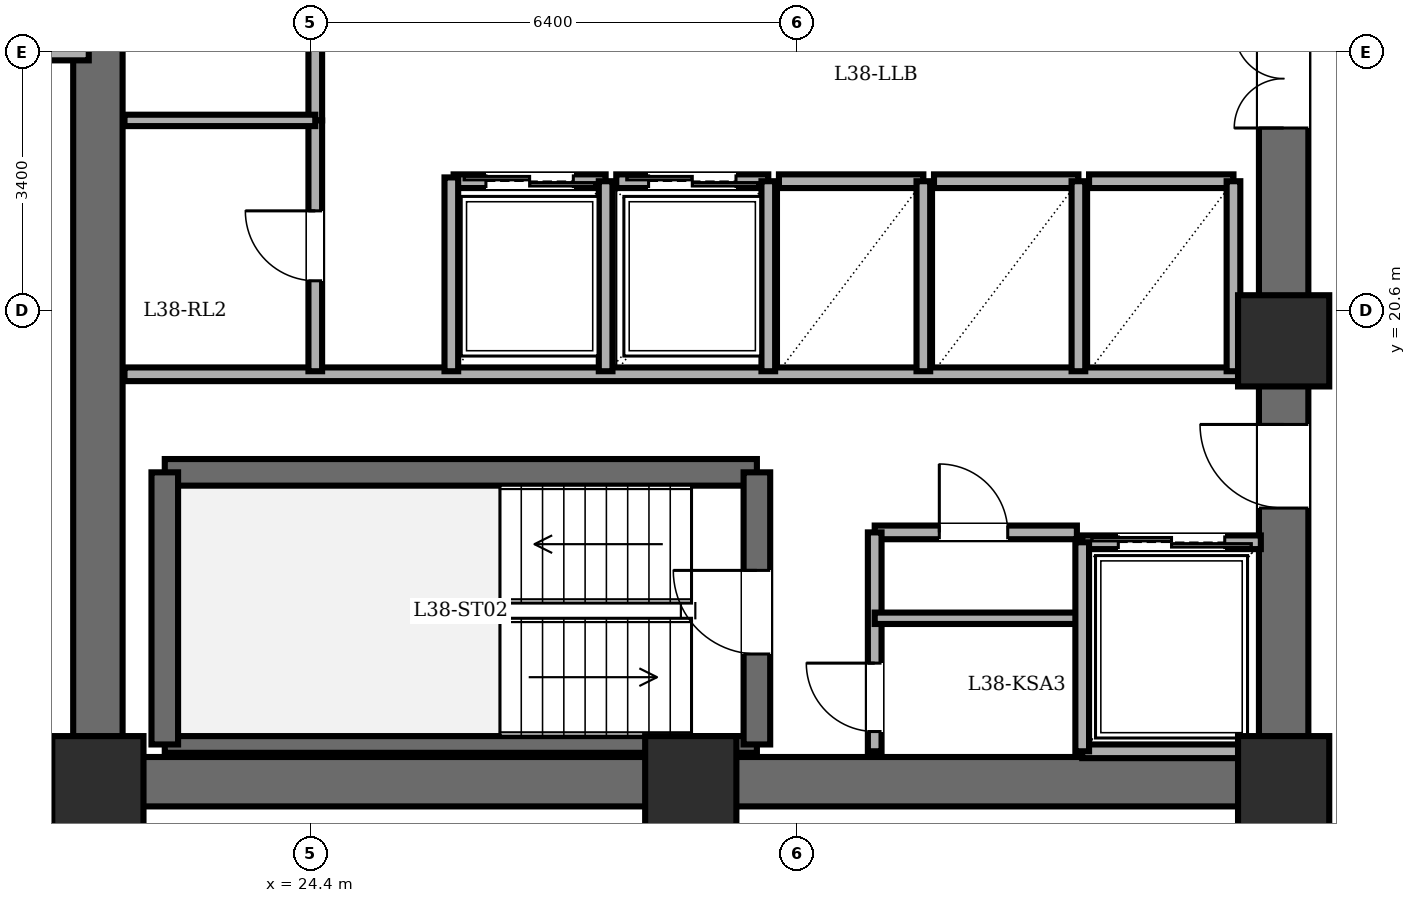
"""IFC4 building model, lengths in metres.
Left out: names, types, materials, properties, quantities, classifications, styles, units other than length and angle.
Written with IfcOpenShell. Run it as: python <this file> out.ifc"""

import sys

from ifc_helpers import new_model, si_unit, direction, frame, frame_2d, origin, origin_2d, place, context, subcontext, project, spatial, rectangle, extrude, element, fill, save


model = new_model("IFC4")
c1 = context("Model", 3, precision=1e-05, world=origin(), true_north=direction((0.0, 1.0)))
c2 = subcontext(c1, "Body", "Model", "MODEL_VIEW")
j1 = project(units=[si_unit("LENGTHUNIT", "METRE"), si_unit("PLANEANGLEUNIT", "RADIAN")], contexts=[c1])
p1 = place(None, origin())
s1 = spatial("IfcSite", under=j1, at=p1, CompositionType="ELEMENT")
p2 = place(p1, origin())
s2 = spatial("IfcBuilding", under=s1, at=p2, CompositionType="ELEMENT")
p3 = place(p2, frame((0.0, 0.0, 147.4)))
s3 = spatial("IfcBuildingStorey", under=s2, at=p3, CompositionType="ELEMENT", Elevation=147.4)
for number, where, z_axis, x_axis in (
    (1, (21.6, 14.4, 0.0), (0.0, 0.0, 1.0), (1.0, 0.0, 0.0)),
    (2, (29.4, 14.4, 0.0), (0.0, 0.0, 1.0), (1.0, 0.0, 0.0)),
    (3, (37.2, 14.4, 0.0), (0.0, 0.0, 1.0), (1.0, 0.0, 0.0)),
    (4, (37.2, 20.2, 0.0), (0.0, 0.0, 1.0), (1.0, 0.0, 0.0)),
):
    element("IfcColumn", number, at=place(p3, frame(where, z_axis=z_axis, x_axis=x_axis)), inside=s3, PredefinedType="COLUMN", context=c2, shape_type="SweptSolid", body=[
        extrude(rectangle(XDim=1.2, YDim=1.2, at=origin_2d()), origin(), (0.0, 0.0, 1.0), 3.6),
    ])
p4 = place(p3, frame((21.6, 14.4, 0.0), z_axis=(0.0, 0.0, 1.0), x_axis=(0.0, 1.0, 0.0)))
e5 = element("IfcWall", 5, at=p4, inside=s3, PredefinedType="SHEAR", context=c2, shape_type="SweptSolid", body=[
    extrude(rectangle(XDim=19.2, YDim=0.65, at=frame_2d((9.6, 0.0))), origin(), (0.0, 0.0, 1.0), 3.4),
])
p5 = place(p3, frame((37.2, 14.4, 0.0), z_axis=(0.0, 0.0, 1.0), x_axis=(-1.0, 0.0, 0.0)))
e6 = element("IfcWall", 6, at=p5, inside=s3, PredefinedType="SHEAR", context=c2, shape_type="SweptSolid", body=[
    extrude(rectangle(XDim=15.6, YDim=0.65, at=frame_2d((7.8, 0.0))), origin(), (0.0, 0.0, 1.0), 3.4),
])
p6 = place(p3, frame((37.2, 14.4, 0.0), z_axis=(0.0, 0.0, 1.0), x_axis=(0.0, 1.0, 0.0)))
e7 = element("IfcWall", 7, at=p6, inside=s3, PredefinedType="SHEAR", context=c2, shape_type="SweptSolid", body=[
    extrude(rectangle(XDim=19.2, YDim=0.65, at=frame_2d((9.6, 0.0))), origin(), (0.0, 0.0, 1.0), 3.4),
])
p7 = place(p6, frame((15.8, 0.0, 0.0)))
e8 = element("IfcOpeningElement", 8, at=p7, cuts=e7, PredefinedType="OPENING", context=c2, shape_type="SweptSolid", body=[
    extrude(rectangle(XDim=1.15, YDim=2.15, at=frame_2d((0.575, 1.075))), frame((0.0, 0.335, 0.0), z_axis=(0.0, -1.0, 0.0), x_axis=(1.0, 0.0, 0.0)), (0.0, 0.0, 1.0), 0.67),
])
p8 = place(p6, frame((3.6, 0.0, 0.0)))
e9 = element("IfcOpeningElement", 9, at=p8, cuts=e7, PredefinedType="OPENING", context=c2, shape_type="SweptSolid", body=[
    extrude(rectangle(XDim=1.1, YDim=2.15, at=frame_2d((0.55, 1.075))), frame((0.0, 0.335, 0.0), z_axis=(0.0, -1.0, 0.0), x_axis=(1.0, 0.0, 0.0)), (0.0, 0.0, 1.0), 0.67),
])
p9 = place(p6, frame((8.6, 0.0, 0.0)))
e10 = element("IfcOpeningElement", 10, at=p9, cuts=e7, PredefinedType="OPENING", context=c2, shape_type="SweptSolid", body=[
    extrude(rectangle(XDim=1.3, YDim=2.2, at=frame_2d((0.65, 1.1))), frame((0.0, 0.335, 0.0), z_axis=(0.0, -1.0, 0.0), x_axis=(1.0, 0.0, 0.0)), (0.0, 0.0, 1.0), 0.67),
])
p10 = place(p3, frame((22.48, 18.47, 0.0), z_axis=(0.0, 0.0, 1.0), x_axis=(1.0, 0.0, 0.0)))
e11 = element("IfcWall", 11, at=p10, inside=s3, PredefinedType="SOLIDWALL", context=c2, shape_type="SweptSolid", body=[
    extrude(rectangle(XDim=7.79, YDim=0.35, at=frame_2d((3.895, 0.0))), origin(), (0.0, 0.0, 1.0), 3.4),
])
p11 = place(p3, frame((22.48, 14.89, 0.0), z_axis=(0.0, 0.0, 1.0), x_axis=(1.0, 0.0, 0.0)))
e12 = element("IfcWall", 12, at=p11, inside=s3, PredefinedType="PARTITIONING", context=c2, shape_type="SweptSolid", body=[
    extrude(rectangle(XDim=7.79, YDim=0.22, at=frame_2d((3.895, 0.0))), origin(), (0.0, 0.0, 1.0), 3.4),
])
p12 = place(p3, frame((22.48, 14.89, 0.0), z_axis=(0.0, 0.0, 1.0), x_axis=(0.0, 1.0, 0.0)))
e13 = element("IfcWall", 13, at=p12, inside=s3, PredefinedType="SOLIDWALL", context=c2, shape_type="SweptSolid", body=[
    extrude(rectangle(XDim=3.58, YDim=0.35, at=frame_2d((1.79, 0.0))), origin(), (0.0, 0.0, 1.0), 3.4),
])
p13 = place(p3, frame((30.27, 14.89, 0.0), z_axis=(0.0, 0.0, 1.0), x_axis=(0.0, 1.0, 0.0)))
e14 = element("IfcWall", 14, at=p13, inside=s3, PredefinedType="SOLIDWALL", context=c2, shape_type="SweptSolid", body=[
    extrude(rectangle(XDim=3.58, YDim=0.35, at=frame_2d((1.79, 0.0))), origin(), (0.0, 0.0, 1.0), 3.4),
])
p14 = place(p13, frame((1.19, 0.0, 0.0)))
e15 = element("IfcOpeningElement", 15, at=p14, cuts=e14, PredefinedType="OPENING", context=c2, shape_type="SweptSolid", body=[
    extrude(rectangle(XDim=1.1, YDim=2.15, at=frame_2d((0.55, 1.075))), frame((0.0, 0.185, 0.0), z_axis=(0.0, -1.0, 0.0), x_axis=(1.0, 0.0, 0.0)), (0.0, 0.0, 1.0), 0.37),
])
p15 = place(p3, frame((21.95, 19.76, 0.0), z_axis=(0.0, 0.0, 1.0), x_axis=(1.0, 0.0, 0.0)))
e16 = element("IfcWall", 16, at=p15, inside=s3, PredefinedType="PARTITIONING", context=c2, shape_type="SweptSolid", body=[
    extrude(rectangle(XDim=14.87, YDim=0.18, at=frame_2d((7.435, 0.0))), origin(), (0.0, 0.0, 1.0), 3.4),
])
p16 = place(p3, frame((31.82, 17.68, 0.0), z_axis=(0.0, 0.0, 1.0), x_axis=(1.0, 0.0, 0.0)))
e17 = element("IfcWall", 17, at=p16, inside=s3, PredefinedType="PARTITIONING", context=c2, shape_type="SweptSolid", body=[
    extrude(rectangle(XDim=2.66, YDim=0.18, at=frame_2d((1.33, 0.0))), origin(), (0.0, 0.0, 1.0), 3.4),
])
p17 = place(p16, frame((0.85, 0.0, 0.0)))
e18 = element("IfcOpeningElement", 18, at=p17, cuts=e17, PredefinedType="OPENING", context=c2, shape_type="SweptSolid", body=[
    extrude(rectangle(XDim=0.9, YDim=2.05, at=frame_2d((0.45, 1.025))), frame((0.0, 0.1, 0.0), z_axis=(0.0, -1.0, 0.0), x_axis=(1.0, 0.0, 0.0)), (0.0, 0.0, 1.0), 0.2),
])
p18 = place(p3, frame((31.82, 14.8, 0.0), z_axis=(0.0, 0.0, 1.0), x_axis=(0.0, 1.0, 0.0)))
e19 = element("IfcWall", 19, at=p18, inside=s3, PredefinedType="PARTITIONING", context=c2, shape_type="SweptSolid", body=[
    extrude(rectangle(XDim=2.88, YDim=0.18, at=frame_2d((1.44, 0.0))), origin(), (0.0, 0.0, 1.0), 3.4),
])
p19 = place(p18, frame((0.26, 0.0, 0.0)))
e20 = element("IfcOpeningElement", 20, at=p19, cuts=e19, PredefinedType="OPENING", context=c2, shape_type="SweptSolid", body=[
    extrude(rectangle(XDim=0.9, YDim=2.05, at=frame_2d((0.45, 1.025))), frame((0.0, 0.1, 0.0), z_axis=(0.0, -1.0, 0.0), x_axis=(1.0, 0.0, 0.0)), (0.0, 0.0, 1.0), 0.2),
])
p20 = place(p3, frame((31.82, 16.55, 0.0), z_axis=(0.0, 0.0, 1.0), x_axis=(1.0, 0.0, 0.0)))
e21 = element("IfcWall", 21, at=p20, inside=s3, PredefinedType="PARTITIONING", context=c2, shape_type="SweptSolid", body=[
    extrude(rectangle(XDim=2.66, YDim=0.15, at=frame_2d((1.33, 0.0))), origin(), (0.0, 0.0, 1.0), 3.4),
])
p21 = place(p3, frame((34.55, 17.55, 0.0), z_axis=(0.0, 0.0, 1.0), x_axis=(1.0, 0.0, 0.0)))
e22 = element("IfcWall", 22, at=p21, inside=s3, PredefinedType="PARTITIONING", context=c2, shape_type="SweptSolid", body=[
    extrude(rectangle(XDim=2.35, YDim=0.18, at=frame_2d((1.175, 0.0))), origin(), (0.0, 0.0, 1.0), 3.4),
])
p22 = place(p21, frame((0.475, 0.0, 0.0)))
e23 = element("IfcOpeningElement", 23, at=p22, cuts=e22, PredefinedType="OPENING", context=c2, shape_type="SweptSolid", body=[
    extrude(rectangle(XDim=1.4, YDim=2.3, at=frame_2d((0.7, 1.15))), frame((0.0, 0.1, 0.0), z_axis=(0.0, -1.0, 0.0), x_axis=(1.0, 0.0, 0.0)), (0.0, 0.0, 1.0), 0.2),
])
p23 = place(p3, frame((36.9, 14.8, 0.0), z_axis=(0.0, 0.0, 1.0), x_axis=(-1.0, 0.0, 0.0)))
e24 = element("IfcWall", 24, at=p23, inside=s3, PredefinedType="PARTITIONING", context=c2, shape_type="SweptSolid", body=[
    extrude(rectangle(XDim=2.35, YDim=0.18, at=frame_2d((1.175, 0.0))), origin(), (0.0, 0.0, 1.0), 3.4),
])
p24 = place(p3, frame((34.55, 17.55, 0.0), z_axis=(0.0, 0.0, 1.0), x_axis=(0.0, -1.0, 0.0)))
e25 = element("IfcWall", 25, at=p24, inside=s3, PredefinedType="PARTITIONING", context=c2, shape_type="SweptSolid", body=[
    extrude(rectangle(XDim=2.75, YDim=0.18, at=frame_2d((1.375, 0.0))), origin(), (0.0, 0.0, 1.0), 3.4),
])
p25 = place(p3, frame((26.28, 22.3, 0.0), z_axis=(0.0, 0.0, 1.0), x_axis=(1.0, 0.0, 0.0)))
e26 = element("IfcWall", 26, at=p25, inside=s3, PredefinedType="PARTITIONING", context=c2, shape_type="SweptSolid", body=[
    extrude(rectangle(XDim=2.0, YDim=0.18, at=frame_2d((1.0, 0.0))), origin(), (0.0, 0.0, 1.0), 3.4),
])
p26 = place(p25, frame((0.425, 0.0, 0.0)))
e27 = element("IfcOpeningElement", 27, at=p26, cuts=e26, PredefinedType="OPENING", context=c2, shape_type="SweptSolid", body=[
    extrude(rectangle(XDim=1.15, YDim=2.2, at=frame_2d((0.575, 1.1))), frame((0.0, 0.1, 0.0), z_axis=(0.0, -1.0, 0.0), x_axis=(1.0, 0.0, 0.0)), (0.0, 0.0, 1.0), 0.2),
])
p27 = place(p3, frame((28.28, 19.8, 0.0), z_axis=(0.0, 0.0, 1.0), x_axis=(0.0, 1.0, 0.0)))
e28 = element("IfcWall", 28, at=p27, inside=s3, PredefinedType="PARTITIONING", context=c2, shape_type="SweptSolid", body=[
    extrude(rectangle(XDim=2.5, YDim=0.18, at=frame_2d((1.25, 0.0))), origin(), (0.0, 0.0, 1.0), 3.4),
])
p28 = place(p3, frame((28.42, 22.3, 0.0), z_axis=(0.0, 0.0, 1.0), x_axis=(1.0, 0.0, 0.0)))
e29 = element("IfcWall", 29, at=p28, inside=s3, PredefinedType="PARTITIONING", context=c2, shape_type="SweptSolid", body=[
    extrude(rectangle(XDim=2.0, YDim=0.18, at=frame_2d((1.0, 0.0))), origin(), (0.0, 0.0, 1.0), 3.4),
])
p29 = place(p28, frame((0.425, 0.0, 0.0)))
e30 = element("IfcOpeningElement", 30, at=p29, cuts=e29, PredefinedType="OPENING", context=c2, shape_type="SweptSolid", body=[
    extrude(rectangle(XDim=1.15, YDim=2.2, at=frame_2d((0.575, 1.1))), frame((0.0, 0.1, 0.0), z_axis=(0.0, -1.0, 0.0), x_axis=(1.0, 0.0, 0.0)), (0.0, 0.0, 1.0), 0.2),
])
p30 = place(p3, frame((30.42, 19.8, 0.0), z_axis=(0.0, 0.0, 1.0), x_axis=(0.0, 1.0, 0.0)))
e31 = element("IfcWall", 31, at=p30, inside=s3, PredefinedType="PARTITIONING", context=c2, shape_type="SweptSolid", body=[
    extrude(rectangle(XDim=2.5, YDim=0.18, at=frame_2d((1.25, 0.0))), origin(), (0.0, 0.0, 1.0), 3.4),
])
p31 = place(p3, frame((30.56, 22.3, 0.0), z_axis=(0.0, 0.0, 1.0), x_axis=(1.0, 0.0, 0.0)))
e32 = element("IfcWall", 32, at=p31, inside=s3, PredefinedType="PARTITIONING", context=c2, shape_type="SweptSolid", body=[
    extrude(rectangle(XDim=1.9, YDim=0.18, at=frame_2d((0.95, 0.0))), origin(), (0.0, 0.0, 1.0), 3.4),
])
p32 = place(p3, frame((32.46, 19.8, 0.0), z_axis=(0.0, 0.0, 1.0), x_axis=(0.0, 1.0, 0.0)))
e33 = element("IfcWall", 33, at=p32, inside=s3, PredefinedType="PARTITIONING", context=c2, shape_type="SweptSolid", body=[
    extrude(rectangle(XDim=2.5, YDim=0.18, at=frame_2d((1.25, 0.0))), origin(), (0.0, 0.0, 1.0), 3.4),
])
p33 = place(p3, frame((32.6, 22.3, 0.0), z_axis=(0.0, 0.0, 1.0), x_axis=(1.0, 0.0, 0.0)))
e34 = element("IfcWall", 34, at=p33, inside=s3, PredefinedType="PARTITIONING", context=c2, shape_type="SweptSolid", body=[
    extrude(rectangle(XDim=1.9, YDim=0.18, at=frame_2d((0.95, 0.0))), origin(), (0.0, 0.0, 1.0), 3.4),
])
p34 = place(p3, frame((34.5, 19.8, 0.0), z_axis=(0.0, 0.0, 1.0), x_axis=(0.0, 1.0, 0.0)))
e35 = element("IfcWall", 35, at=p34, inside=s3, PredefinedType="PARTITIONING", context=c2, shape_type="SweptSolid", body=[
    extrude(rectangle(XDim=2.5, YDim=0.18, at=frame_2d((1.25, 0.0))), origin(), (0.0, 0.0, 1.0), 3.4),
])
p35 = place(p3, frame((34.64, 22.3, 0.0), z_axis=(0.0, 0.0, 1.0), x_axis=(1.0, 0.0, 0.0)))
e36 = element("IfcWall", 36, at=p35, inside=s3, PredefinedType="PARTITIONING", context=c2, shape_type="SweptSolid", body=[
    extrude(rectangle(XDim=1.9, YDim=0.18, at=frame_2d((0.95, 0.0))), origin(), (0.0, 0.0, 1.0), 3.4),
])
p36 = place(p3, frame((36.54, 19.8, 0.0), z_axis=(0.0, 0.0, 1.0), x_axis=(0.0, 1.0, 0.0)))
e37 = element("IfcWall", 37, at=p36, inside=s3, PredefinedType="PARTITIONING", context=c2, shape_type="SweptSolid", body=[
    extrude(rectangle(XDim=2.5, YDim=0.18, at=frame_2d((1.25, 0.0))), origin(), (0.0, 0.0, 1.0), 3.4),
])
p37 = place(p3, frame((24.46, 23.1, 0.0), z_axis=(0.0, 0.0, 1.0), x_axis=(0.0, 1.0, 0.0)))
e38 = element("IfcWall", 38, at=p37, inside=s3, PredefinedType="PARTITIONING", context=c2, shape_type="SweptSolid", body=[
    extrude(rectangle(XDim=4.4, YDim=0.18, at=frame_2d((2.2, 0.0))), origin(), (0.0, 0.0, 1.0), 3.4),
])
p38 = place(p37, frame((1.74, 0.0, 0.0)))
e39 = element("IfcOpeningElement", 39, at=p38, cuts=e38, PredefinedType="OPENING", context=c2, shape_type="SweptSolid", body=[
    extrude(rectangle(XDim=0.92, YDim=2.1, at=frame_2d((0.46, 1.05))), frame((0.0, 0.1, 0.0), z_axis=(0.0, -1.0, 0.0), x_axis=(1.0, 0.0, 0.0)), (0.0, 0.0, 1.0), 0.2),
])
p39 = place(p3, frame((24.46, 19.8, 0.0), z_axis=(0.0, 0.0, 1.0), x_axis=(0.0, 1.0, 0.0)))
e40 = element("IfcWall", 40, at=p39, inside=s3, PredefinedType="PARTITIONING", context=c2, shape_type="SweptSolid", body=[
    extrude(rectangle(XDim=3.3, YDim=0.18, at=frame_2d((1.65, 0.0))), origin(), (0.0, 0.0, 1.0), 3.4),
])
p40 = place(p39, frame((1.19, 0.0, 0.0)))
e41 = element("IfcOpeningElement", 41, at=p40, cuts=e40, PredefinedType="OPENING", context=c2, shape_type="SweptSolid", body=[
    extrude(rectangle(XDim=0.92, YDim=2.1, at=frame_2d((0.46, 1.05))), frame((0.0, 0.1, 0.0), z_axis=(0.0, -1.0, 0.0), x_axis=(1.0, 0.0, 0.0)), (0.0, 0.0, 1.0), 0.2),
])
p41 = place(p3, frame((21.95, 23.1, 0.0), z_axis=(0.0, 0.0, 1.0), x_axis=(1.0, 0.0, 0.0)))
e42 = element("IfcWall", 42, at=p41, inside=s3, PredefinedType="PARTITIONING", context=c2, shape_type="SweptSolid", body=[
    extrude(rectangle(XDim=2.51, YDim=0.15, at=frame_2d((1.255, 0.0))), origin(), (0.0, 0.0, 1.0), 3.4),
])
p42 = place(p3, frame((26.25, 19.8, 0.0), z_axis=(0.0, 0.0, 1.0), x_axis=(0.0, 1.0, 0.0)))
e43 = element("IfcWall", 43, at=p42, inside=s3, PredefinedType="PARTITIONING", context=c2, shape_type="SweptSolid", body=[
    extrude(rectangle(XDim=2.55, YDim=0.18, at=frame_2d((1.275, 0.0))), origin(), (0.0, 0.0, 1.0), 3.4),
])
p43 = place(p3, frame((13.8, 14.18, 0.0), z_axis=(0.0, 0.0, 1.0), x_axis=(1.0, 0.0, 0.0)))
e44 = element("IfcWall", 44, at=p43, inside=s3, PredefinedType="PARTITIONING", context=c2, shape_type="SweptSolid", body=[
    extrude(rectangle(XDim=7.68, YDim=0.22, at=frame_2d((3.84, 0.0))), origin(), (0.0, 0.0, 1.0), 3.4),
])
p44 = place(p43, frame((3.68, 0.0, 0.0)))
e45 = element("IfcOpeningElement", 45, at=p44, cuts=e44, PredefinedType="OPENING", context=c2, shape_type="SweptSolid", body=[
    extrude(rectangle(XDim=1.0, YDim=2.15, at=frame_2d((0.5, 1.075))), frame((0.0, 0.12, 0.0), z_axis=(0.0, -1.0, 0.0), x_axis=(1.0, 0.0, 0.0)), (0.0, 0.0, 1.0), 0.24),
])
p45 = place(p3, frame((13.8, 24.0, 0.0), z_axis=(0.0, 0.0, 1.0), x_axis=(1.0, 0.0, 0.0)))
e46 = element("IfcWall", 46, at=p45, inside=s3, PredefinedType="PARTITIONING", context=c2, shape_type="SweptSolid", body=[
    extrude(rectangle(XDim=7.68, YDim=0.22, at=frame_2d((3.84, 0.0))), origin(), (0.0, 0.0, 1.0), 3.4),
])
p46 = place(p14, origin())
e47 = element("IfcDoor", 47, at=p46, inside=s3, OperationType="SINGLE_SWING_RIGHT", PredefinedType="DOOR", context=c2, shape_type="SweptSolid", body=[
    extrude(rectangle(XDim=1.1, YDim=2.15, at=frame_2d((0.55, 1.075))), frame((0.0, 0.025, 0.0), z_axis=(0.0, -1.0, 0.0), x_axis=(1.0, 0.0, 0.0)), (0.0, 0.0, 1.0), 0.05),
])
fill(e15, e47)
p47 = place(p8, origin())
e48 = element("IfcDoor", 48, at=p47, inside=s3, OperationType="SINGLE_SWING_RIGHT", PredefinedType="DOOR", context=c2, shape_type="SweptSolid", body=[
    extrude(rectangle(XDim=1.1, YDim=2.15, at=frame_2d((0.55, 1.075))), frame((0.0, 0.025, 0.0), z_axis=(0.0, -1.0, 0.0), x_axis=(1.0, 0.0, 0.0)), (0.0, 0.0, 1.0), 0.05),
])
fill(e9, e48)
p48 = place(p17, origin())
e49 = element("IfcDoor", 49, at=p48, inside=s3, OperationType="SINGLE_SWING_LEFT", PredefinedType="DOOR", context=c2, shape_type="SweptSolid", body=[
    extrude(rectangle(XDim=0.9, YDim=2.05, at=frame_2d((0.45, 1.025))), frame((0.0, 0.025, 0.0), z_axis=(0.0, -1.0, 0.0), x_axis=(1.0, 0.0, 0.0)), (0.0, 0.0, 1.0), 0.05),
])
fill(e18, e49)
p49 = place(p19, origin())
e50 = element("IfcDoor", 50, at=p49, inside=s3, OperationType="SINGLE_SWING_RIGHT", PredefinedType="DOOR", context=c2, shape_type="SweptSolid", body=[
    extrude(rectangle(XDim=0.9, YDim=2.05, at=frame_2d((0.45, 1.025))), frame((0.0, 0.025, 0.0), z_axis=(0.0, -1.0, 0.0), x_axis=(1.0, 0.0, 0.0)), (0.0, 0.0, 1.0), 0.05),
])
fill(e20, e50)
p50 = place(p22, origin())
e51 = element("IfcDoor", 51, at=p50, inside=s3, OperationType="DOUBLE_DOOR_SLIDING", PredefinedType="DOOR", context=c2, shape_type="SweptSolid", body=[
    extrude(rectangle(XDim=1.4, YDim=2.3, at=frame_2d((0.7, 1.15))), frame((0.0, 0.025, 0.0), z_axis=(0.0, -1.0, 0.0), x_axis=(1.0, 0.0, 0.0)), (0.0, 0.0, 1.0), 0.05),
])
fill(e23, e51)
p51 = place(p26, origin())
e52 = element("IfcDoor", 52, at=p51, inside=s3, OperationType="DOUBLE_DOOR_SLIDING", PredefinedType="DOOR", context=c2, shape_type="SweptSolid", body=[
    extrude(rectangle(XDim=1.15, YDim=2.2, at=frame_2d((0.575, 1.1))), frame((0.0, 0.025, 0.0), z_axis=(0.0, -1.0, 0.0), x_axis=(1.0, 0.0, 0.0)), (0.0, 0.0, 1.0), 0.05),
])
fill(e27, e52)
p52 = place(p29, origin())
e53 = element("IfcDoor", 53, at=p52, inside=s3, OperationType="DOUBLE_DOOR_SLIDING", PredefinedType="DOOR", context=c2, shape_type="SweptSolid", body=[
    extrude(rectangle(XDim=1.15, YDim=2.2, at=frame_2d((0.575, 1.1))), frame((0.0, 0.025, 0.0), z_axis=(0.0, -1.0, 0.0), x_axis=(1.0, 0.0, 0.0)), (0.0, 0.0, 1.0), 0.05),
])
fill(e30, e53)
p53 = place(p40, origin())
e54 = element("IfcDoor", 54, at=p53, inside=s3, OperationType="SINGLE_SWING_RIGHT", PredefinedType="DOOR", context=c2, shape_type="SweptSolid", body=[
    extrude(rectangle(XDim=0.92, YDim=2.1, at=frame_2d((0.46, 1.05))), frame((0.0, 0.025, 0.0), z_axis=(0.0, -1.0, 0.0), x_axis=(1.0, 0.0, 0.0)), (0.0, 0.0, 1.0), 0.05),
])
fill(e41, e54)
p54 = place(p9, origin())
e55 = element("IfcDoor", 55, at=p54, inside=s3, OperationType="DOUBLE_DOOR_SINGLE_SWING", PredefinedType="DOOR", context=c2, shape_type="SweptSolid", body=[
    extrude(rectangle(XDim=1.3, YDim=2.2, at=frame_2d((0.65, 1.1))), frame((0.0, 0.025, 0.0), z_axis=(0.0, -1.0, 0.0), x_axis=(1.0, 0.0, 0.0)), (0.0, 0.0, 1.0), 0.05),
])
fill(e10, e55)
save(model, sys.argv[1])
